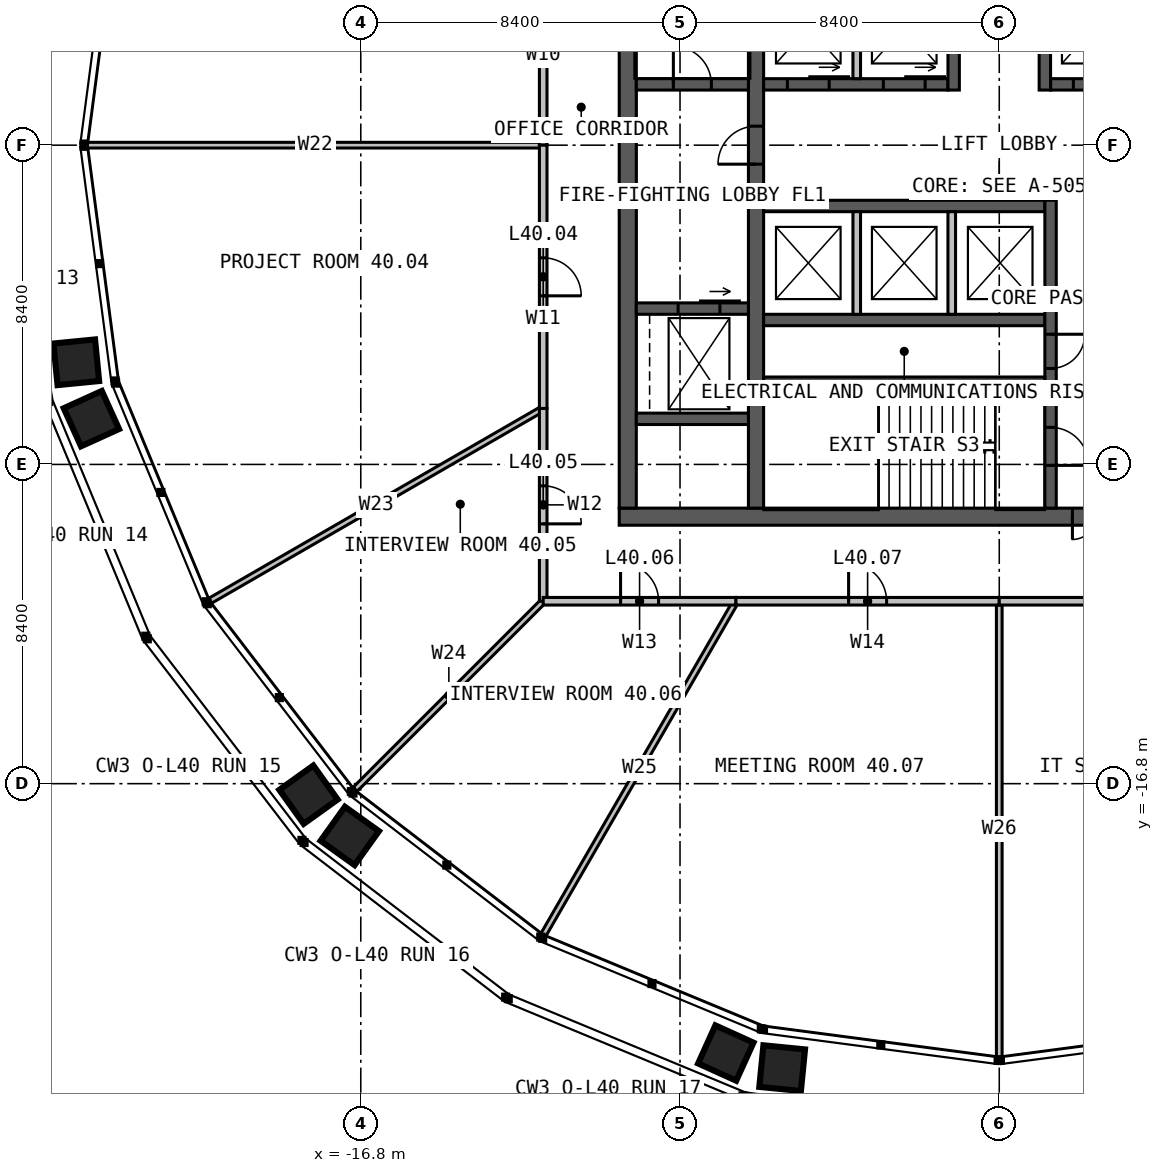
"""IFC4 building model, lengths in metres.
Left out: names, types, materials, properties, quantities, classifications, styles, units other than length and angle.
Written with IfcOpenShell. Run it as: python <this file> out.ifc"""

import sys

from ifc_helpers import new_model, si_unit, direction, frame, frame_2d, origin, place, context, subcontext, project, spatial, rectangle, extrude, element, fill, save


model = new_model("IFC4")
c1 = context("Model", 3, precision=1e-05, world=origin(), true_north=direction((0.0, 1.0)))
c2 = subcontext(c1, "Body", "Model", "MODEL_VIEW")
j1 = project(units=[si_unit("LENGTHUNIT", "METRE"), si_unit("PLANEANGLEUNIT", "RADIAN")], contexts=[c1])
p1 = place(None, origin())
s1 = spatial("IfcSite", under=j1, at=p1, CompositionType="ELEMENT")
p2 = place(p1, origin())
s2 = spatial("IfcBuilding", under=s1, at=p2, CompositionType="ELEMENT")
p3 = place(p2, frame((0.0, 0.0, 167.0)))
s3 = spatial("IfcBuildingStorey", under=s2, at=p3, CompositionType="ELEMENT", Elevation=167.0)
p4 = place(p3, frame((10.0, -9.775, 0.0), z_axis=(0.0, 0.0, 1.0), x_axis=(-1.0, 0.0, 0.0)))
e1 = element("IfcWall", 1, at=p4, inside=s3, PredefinedType="SOLIDWALL", context=c2, shape_type="SweptSolid", body=[
    extrude(rectangle(XDim=20.0, YDim=0.45, at=frame_2d((10.0, 0.0))), origin(), (0.0, 0.0, 1.0), 4.0),
])
p5 = place(p4, frame((6.875, 0.0, 0.0)))
e2 = element("IfcOpeningElement", 2, at=p5, cuts=e1, PredefinedType="OPENING", context=c2, shape_type="SweptSolid", body=[
    extrude(rectangle(XDim=1.2, YDim=2.2, at=frame_2d((0.6, 1.1))), frame((0.0, 0.235, 0.0), z_axis=(0.0, -1.0, 0.0), x_axis=(1.0, 0.0, 0.0)), (0.0, 0.0, 1.0), 0.47),
])
p6 = place(p3, frame((-9.775, 9.55, 0.0), z_axis=(0.0, 0.0, 1.0), x_axis=(0.0, -1.0, 0.0)))
e3 = element("IfcWall", 3, at=p6, inside=s3, PredefinedType="SOLIDWALL", context=c2, shape_type="SweptSolid", body=[
    extrude(rectangle(XDim=19.1, YDim=0.45, at=frame_2d((9.55, 0.0))), origin(), (0.0, 0.0, 1.0), 4.0),
])
p7 = place(p3, frame((-6.4, -9.55, 0.0), z_axis=(0.0, 0.0, 1.0), x_axis=(0.0, 1.0, 0.0)))
e4 = element("IfcWall", 4, at=p7, inside=s3, PredefinedType="SOLIDWALL", context=c2, shape_type="SweptSolid", body=[
    extrude(rectangle(XDim=19.1, YDim=0.4, at=frame_2d((9.55, 0.0))), origin(), (0.0, 0.0, 1.0), 4.0),
])
p8 = place(p7, frame((9.05, 0.0, 0.0)))
e5 = element("IfcOpeningElement", 5, at=p8, cuts=e4, PredefinedType="OPENING", context=c2, shape_type="SweptSolid", body=[
    extrude(rectangle(XDim=1.0, YDim=2.2, at=frame_2d((0.5, 1.1))), frame((0.0, 0.21, 0.0), z_axis=(0.0, -1.0, 0.0), x_axis=(1.0, 0.0, 0.0)), (0.0, 0.0, 1.0), 0.42),
])
p9 = place(p3, frame((-6.2, 1.6, 0.0), z_axis=(0.0, 0.0, 1.0), x_axis=(1.0, 0.0, 0.0)))
e6 = element("IfcWall", 6, at=p9, inside=s3, PredefinedType="SOLIDWALL", context=c2, shape_type="SweptSolid", body=[
    extrude(rectangle(XDim=4.85, YDim=0.3, at=frame_2d((2.425, 0.0))), origin(), (0.0, 0.0, 1.0), 4.0),
])
p10 = place(p9, frame((0.625, 0.0, 0.0)))
e7 = element("IfcOpeningElement", 7, at=p10, cuts=e6, PredefinedType="OPENING", context=c2, shape_type="SweptSolid", body=[
    extrude(rectangle(XDim=1.1, YDim=2.2, at=frame_2d((0.55, 1.1))), frame((0.0, 0.16, 0.0), z_axis=(0.0, -1.0, 0.0), x_axis=(1.0, 0.0, 0.0)), (0.0, 0.0, 1.0), 0.32),
])
p11 = place(p9, frame((3.15, 0.0, 0.0)))
e8 = element("IfcOpeningElement", 8, at=p11, cuts=e6, PredefinedType="OPENING", context=c2, shape_type="SweptSolid", body=[
    extrude(rectangle(XDim=1.1, YDim=2.2, at=frame_2d((0.55, 1.1))), frame((0.0, 0.16, 0.0), z_axis=(0.0, -1.0, 0.0), x_axis=(1.0, 0.0, 0.0)), (0.0, 0.0, 1.0), 0.32),
])
p12 = place(p3, frame((1.35, 1.6, 0.0), z_axis=(0.0, 0.0, 1.0), x_axis=(1.0, 0.0, 0.0)))
e9 = element("IfcWall", 9, at=p12, inside=s3, PredefinedType="SOLIDWALL", context=c2, shape_type="SweptSolid", body=[
    extrude(rectangle(XDim=4.85, YDim=0.3, at=frame_2d((2.425, 0.0))), origin(), (0.0, 0.0, 1.0), 4.0),
])
p13 = place(p12, frame((0.6, 0.0, 0.0)))
e10 = element("IfcOpeningElement", 10, at=p13, cuts=e9, PredefinedType="OPENING", context=c2, shape_type="SweptSolid", body=[
    extrude(rectangle(XDim=1.1, YDim=2.2, at=frame_2d((0.55, 1.1))), frame((0.0, 0.16, 0.0), z_axis=(0.0, -1.0, 0.0), x_axis=(1.0, 0.0, 0.0)), (0.0, 0.0, 1.0), 0.32),
])
p14 = place(p12, frame((3.125, 0.0, 0.0)))
e11 = element("IfcOpeningElement", 11, at=p14, cuts=e9, PredefinedType="OPENING", context=c2, shape_type="SweptSolid", body=[
    extrude(rectangle(XDim=1.1, YDim=2.2, at=frame_2d((0.55, 1.1))), frame((0.0, 0.16, 0.0), z_axis=(0.0, -1.0, 0.0), x_axis=(1.0, 0.0, 0.0)), (0.0, 0.0, 1.0), 0.32),
])
p15 = place(p3, frame((-1.2, 1.45, 0.0), z_axis=(0.0, 0.0, 1.0), x_axis=(0.0, 1.0, 0.0)))
e12 = element("IfcWall", 12, at=p15, inside=s3, PredefinedType="SOLIDWALL", context=c2, shape_type="SweptSolid", body=[
    extrude(rectangle(XDim=8.1, YDim=0.3, at=frame_2d((4.05, 0.0))), origin(), (0.0, 0.0, 1.0), 4.0),
])
p16 = place(p15, frame((5.05, 0.0, 0.0)))
e13 = element("IfcOpeningElement", 13, at=p16, cuts=e12, PredefinedType="OPENING", context=c2, shape_type="SweptSolid", body=[
    extrude(rectangle(XDim=1.0, YDim=2.2, at=frame_2d((0.5, 1.1))), frame((0.0, 0.16, 0.0), z_axis=(0.0, -1.0, 0.0), x_axis=(1.0, 0.0, 0.0)), (0.0, 0.0, 1.0), 0.32),
])
p17 = place(p3, frame((1.2, 1.45, 0.0), z_axis=(0.0, 0.0, 1.0), x_axis=(0.0, 1.0, 0.0)))
e14 = element("IfcWall", 14, at=p17, inside=s3, PredefinedType="SOLIDWALL", context=c2, shape_type="SweptSolid", body=[
    extrude(rectangle(XDim=8.1, YDim=0.3, at=frame_2d((4.05, 0.0))), origin(), (0.0, 0.0, 1.0), 4.0),
])
p18 = place(p17, frame((3.8, 0.0, 0.0)))
e15 = element("IfcOpeningElement", 15, at=p18, cuts=e14, PredefinedType="OPENING", context=c2, shape_type="SweptSolid", body=[
    extrude(rectangle(XDim=1.0, YDim=2.2, at=frame_2d((0.5, 1.1))), frame((0.0, 0.16, 0.0), z_axis=(0.0, -1.0, 0.0), x_axis=(1.0, 0.0, 0.0)), (0.0, 0.0, 1.0), 0.32),
])
p19 = place(p17, frame((6.15, 0.0, 0.0)))
e16 = element("IfcOpeningElement", 16, at=p19, cuts=e14, PredefinedType="OPENING", context=c2, shape_type="SweptSolid", body=[
    extrude(rectangle(XDim=1.0, YDim=2.2, at=frame_2d((0.5, 1.1))), frame((0.0, 0.16, 0.0), z_axis=(0.0, -1.0, 0.0), x_axis=(1.0, 0.0, 0.0)), (0.0, 0.0, 1.0), 0.32),
])
for number, where, z_axis, x_axis in (
    (17, (-6.2, -1.6, 0.0), (0.0, 0.0, 1.0), (1.0, 0.0, 0.0)),
    (18, (-6.2, -4.6, 0.0), (0.0, 0.0, 1.0), (1.0, 0.0, 0.0)),
):
    element("IfcWall", number, at=place(p3, frame(where, z_axis=z_axis, x_axis=x_axis)), inside=s3, PredefinedType="SOLIDWALL", context=c2, shape_type="SweptSolid", body=[
        extrude(rectangle(XDim=7.4, YDim=0.3, at=frame_2d((3.7, 0.0))), origin(), (0.0, 0.0, 1.0), 4.0),
    ])
p20 = place(p3, frame((1.35, -1.45, 0.0), z_axis=(0.0, 0.0, 1.0), x_axis=(0.0, -1.0, 0.0)))
e19 = element("IfcWall", 19, at=p20, inside=s3, PredefinedType="SOLIDWALL", context=c2, shape_type="SweptSolid", body=[
    extrude(rectangle(XDim=8.1, YDim=0.3, at=frame_2d((4.05, 0.0))), origin(), (0.0, 0.0, 1.0), 4.0),
])
p21 = place(p20, frame((5.975, 0.0, 0.0)))
e20 = element("IfcOpeningElement", 20, at=p21, cuts=e19, PredefinedType="OPENING", context=c2, shape_type="SweptSolid", body=[
    extrude(rectangle(XDim=1.0, YDim=2.2, at=frame_2d((0.5, 1.1))), frame((0.0, 0.16, 0.0), z_axis=(0.0, -1.0, 0.0), x_axis=(1.0, 0.0, 0.0)), (0.0, 0.0, 1.0), 0.32),
])
p22 = place(p20, frame((3.525, 0.0, 0.0)))
e21 = element("IfcOpeningElement", 21, at=p22, cuts=e19, PredefinedType="OPENING", context=c2, shape_type="SweptSolid", body=[
    extrude(rectangle(XDim=0.9, YDim=2.2, at=frame_2d((0.45, 1.1))), frame((0.0, 0.16, 0.0), z_axis=(0.0, -1.0, 0.0), x_axis=(1.0, 0.0, 0.0)), (0.0, 0.0, 1.0), 0.32),
])
p23 = place(p3, frame((-6.2, -6.2, 0.0), z_axis=(0.0, 0.0, 1.0), x_axis=(1.0, 0.0, 0.0)))
e22 = element("IfcWall", 22, at=p23, inside=s3, PredefinedType="SOLIDWALL", context=c2, shape_type="SweptSolid", body=[
    extrude(rectangle(XDim=7.4, YDim=0.2, at=frame_2d((3.7, 0.0))), origin(), (0.0, 0.0, 1.0), 4.0),
])
p24 = place(p3, frame((-9.55, 1.6, 0.0), z_axis=(0.0, 0.0, 1.0), x_axis=(1.0, 0.0, 0.0)))
e23 = element("IfcWall", 23, at=p24, inside=s3, PredefinedType="SOLIDWALL", context=c2, shape_type="SweptSolid", body=[
    extrude(rectangle(XDim=2.95, YDim=0.3, at=frame_2d((1.475, 0.0))), origin(), (0.0, 0.0, 1.0), 4.0),
])
p25 = place(p24, frame((0.975, 0.0, 0.0)))
e24 = element("IfcOpeningElement", 24, at=p25, cuts=e23, PredefinedType="OPENING", context=c2, shape_type="SweptSolid", body=[
    extrude(rectangle(XDim=1.0, YDim=2.2, at=frame_2d((0.5, 1.1))), frame((0.0, 0.16, 0.0), z_axis=(0.0, -1.0, 0.0), x_axis=(1.0, 0.0, 0.0)), (0.0, 0.0, 1.0), 0.32),
])
p26 = place(p3, frame((-9.55, -4.3, 0.0), z_axis=(0.0, 0.0, 1.0), x_axis=(1.0, 0.0, 0.0)))
e25 = element("IfcWall", 25, at=p26, inside=s3, PredefinedType="SOLIDWALL", context=c2, shape_type="SweptSolid", body=[
    extrude(rectangle(XDim=2.95, YDim=0.3, at=frame_2d((1.475, 0.0))), origin(), (0.0, 0.0, 1.0), 4.0),
])
p27 = place(p26, frame((1.1, 0.0, 0.0)))
e26 = element("IfcOpeningElement", 26, at=p27, cuts=e25, PredefinedType="OPENING", context=c2, shape_type="SweptSolid", body=[
    extrude(rectangle(XDim=1.1, YDim=2.2, at=frame_2d((0.55, 1.1))), frame((0.0, 0.16, 0.0), z_axis=(0.0, -1.0, 0.0), x_axis=(1.0, 0.0, 0.0)), (0.0, 0.0, 1.0), 0.32),
])
p28 = place(p3, frame((-9.55, -7.2, 0.0), z_axis=(0.0, 0.0, 1.0), x_axis=(1.0, 0.0, 0.0)))
e27 = element("IfcWall", 27, at=p28, inside=s3, PredefinedType="SOLIDWALL", context=c2, shape_type="SweptSolid", body=[
    extrude(rectangle(XDim=2.95, YDim=0.3, at=frame_2d((1.475, 0.0))), origin(), (0.0, 0.0, 1.0), 4.0),
])
for number, where, z_axis, x_axis in (
    (28, (-3.75, 1.75, 0.0), (0.0, 0.0, 1.0), (0.0, 1.0, 0.0)),
    (29, (-3.75, -1.75, 0.0), (0.0, 0.0, 1.0), (0.0, -1.0, 0.0)),
    (30, (-1.25, -1.75, 0.0), (0.0, 0.0, 1.0), (0.0, -1.0, 0.0)),
):
    element("IfcWall", number, at=place(p3, frame(where, z_axis=z_axis, x_axis=x_axis)), inside=s3, PredefinedType="SOLIDWALL", context=c2, shape_type="SweptSolid", body=[
        extrude(rectangle(XDim=2.7, YDim=0.2, at=frame_2d((1.35, 0.0))), origin(), (0.0, 0.0, 1.0), 3.75),
    ])
p29 = place(p3, frame((-12.0, 0.0, 0.0), z_axis=(0.0, 0.0, 1.0), x_axis=(-1.0, 0.0, 0.0)))
e31 = element("IfcWall", 31, at=p29, inside=s3, PredefinedType="PARTITIONING", context=c2, shape_type="SweptSolid", body=[
    extrude(rectangle(XDim=11.992, YDim=0.15, at=frame_2d((5.996, 0.0))), origin(), (0.0, 0.0, 1.0), 2.79),
])
p30 = place(p3, frame((-12.0, -6.928, 0.0), z_axis=(0.0, 0.0, 1.0), x_axis=(-0.866025941747, -0.49999906822, 0.0)))
e32 = element("IfcWall", 32, at=p30, inside=s3, PredefinedType="PARTITIONING", context=c2, shape_type="SweptSolid", body=[
    extrude(rectangle(XDim=10.136, YDim=0.15, at=frame_2d((5.068, 0.0))), origin(), (0.0, 0.0, 1.0), 2.79),
])
p31 = place(p3, frame((-12.0, -12.0, 0.0), z_axis=(0.0, 0.0, 1.0), x_axis=(-0.707106781187, -0.707106781187, 0.0)))
e33 = element("IfcWall", 33, at=p31, inside=s3, PredefinedType="PARTITIONING", context=c2, shape_type="SweptSolid", body=[
    extrude(rectangle(XDim=7.022, YDim=0.15, at=frame_2d((3.511, 0.0))), origin(), (0.0, 0.0, 1.0), 2.79),
])
p32 = place(p3, frame((-6.928, -12.0, 0.0), z_axis=(0.0, 0.0, 1.0), x_axis=(-0.49999906822, -0.866025941747, 0.0)))
e34 = element("IfcWall", 34, at=p32, inside=s3, PredefinedType="PARTITIONING", context=c2, shape_type="SweptSolid", body=[
    extrude(rectangle(XDim=10.136, YDim=0.15, at=frame_2d((5.068, 0.0))), origin(), (0.0, 0.0, 1.0), 2.79),
])
p33 = place(p3, frame((0.0, -12.0, 0.0), z_axis=(0.0, 0.0, 1.0), x_axis=(0.0, -1.0, 0.0)))
e35 = element("IfcWall", 35, at=p33, inside=s3, PredefinedType="PARTITIONING", context=c2, shape_type="SweptSolid", body=[
    extrude(rectangle(XDim=11.992, YDim=0.15, at=frame_2d((5.996, 0.0))), origin(), (0.0, 0.0, 1.0), 2.79),
])
p34 = place(p3, frame((-12.0, 6.928, 0.0), z_axis=(0.0, 0.0, 1.0), x_axis=(0.0, -1.0, 0.0)))
e36 = element("IfcWall", 36, at=p34, inside=s3, PredefinedType="PARTITIONING", context=c2, shape_type="SweptSolid", body=[
    extrude(rectangle(XDim=6.928, YDim=0.2, at=frame_2d((3.464, 0.0))), origin(), (0.0, 0.0, 1.0), 3.8),
])
p35 = place(p34, frame((2.964, 0.0, 0.0)))
e37 = element("IfcOpeningElement", 37, at=p35, cuts=e36, PredefinedType="OPENING", context=c2, shape_type="SweptSolid", body=[
    extrude(rectangle(XDim=1.0, YDim=2.2, at=frame_2d((0.5, 1.1))), frame((0.0, 0.11, 0.0), z_axis=(0.0, -1.0, 0.0), x_axis=(1.0, 0.0, 0.0)), (0.0, 0.0, 1.0), 0.22),
])
p36 = place(p3, frame((-12.0, 0.0, 0.0), z_axis=(0.0, 0.0, 1.0), x_axis=(0.0, -1.0, 0.0)))
e38 = element("IfcWall", 38, at=p36, inside=s3, PredefinedType="PARTITIONING", context=c2, shape_type="SweptSolid", body=[
    extrude(rectangle(XDim=6.928, YDim=0.2, at=frame_2d((3.464, 0.0))), origin(), (0.0, 0.0, 1.0), 3.8),
])
p37 = place(p36, frame((2.964, 0.0, 0.0)))
e39 = element("IfcOpeningElement", 39, at=p37, cuts=e38, PredefinedType="OPENING", context=c2, shape_type="SweptSolid", body=[
    extrude(rectangle(XDim=1.0, YDim=2.2, at=frame_2d((0.5, 1.1))), frame((0.0, 0.11, 0.0), z_axis=(0.0, -1.0, 0.0), x_axis=(1.0, 0.0, 0.0)), (0.0, 0.0, 1.0), 0.22),
])
p38 = place(p3, frame((-12.0, -6.928, 0.0), z_axis=(0.0, 0.0, 1.0), x_axis=(0.0, -1.0, 0.0)))
e40 = element("IfcWall", 40, at=p38, inside=s3, PredefinedType="PARTITIONING", context=c2, shape_type="SweptSolid", body=[
    extrude(rectangle(XDim=5.072, YDim=0.2, at=frame_2d((2.536, 0.0))), origin(), (0.0, 0.0, 1.0), 3.8),
])
p39 = place(p38, frame((2.036, 0.0, 0.0)))
e41 = element("IfcOpeningElement", 41, at=p39, cuts=e40, PredefinedType="OPENING", context=c2, shape_type="SweptSolid", body=[
    extrude(rectangle(XDim=1.0, YDim=2.2, at=frame_2d((0.5, 1.1))), frame((0.0, 0.11, 0.0), z_axis=(0.0, -1.0, 0.0), x_axis=(1.0, 0.0, 0.0)), (0.0, 0.0, 1.0), 0.22),
])
p40 = place(p3, frame((-12.0, -12.0, 0.0), z_axis=(0.0, 0.0, 1.0), x_axis=(1.0, 0.0, 0.0)))
e42 = element("IfcWall", 42, at=p40, inside=s3, PredefinedType="PARTITIONING", context=c2, shape_type="SweptSolid", body=[
    extrude(rectangle(XDim=5.072, YDim=0.2, at=frame_2d((2.536, 0.0))), origin(), (0.0, 0.0, 1.0), 3.8),
])
p41 = place(p40, frame((2.036, 0.0, 0.0)))
e43 = element("IfcOpeningElement", 43, at=p41, cuts=e42, PredefinedType="OPENING", context=c2, shape_type="SweptSolid", body=[
    extrude(rectangle(XDim=1.0, YDim=2.2, at=frame_2d((0.5, 1.1))), frame((0.0, 0.11, 0.0), z_axis=(0.0, -1.0, 0.0), x_axis=(1.0, 0.0, 0.0)), (0.0, 0.0, 1.0), 0.22),
])
p42 = place(p3, frame((-6.928, -12.0, 0.0), z_axis=(0.0, 0.0, 1.0), x_axis=(1.0, 0.0, 0.0)))
e44 = element("IfcWall", 44, at=p42, inside=s3, PredefinedType="PARTITIONING", context=c2, shape_type="SweptSolid", body=[
    extrude(rectangle(XDim=6.928, YDim=0.2, at=frame_2d((3.464, 0.0))), origin(), (0.0, 0.0, 1.0), 3.8),
])
p43 = place(p42, frame((2.964, 0.0, 0.0)))
e45 = element("IfcOpeningElement", 45, at=p43, cuts=e44, PredefinedType="OPENING", context=c2, shape_type="SweptSolid", body=[
    extrude(rectangle(XDim=1.0, YDim=2.2, at=frame_2d((0.5, 1.1))), frame((0.0, 0.11, 0.0), z_axis=(0.0, -1.0, 0.0), x_axis=(1.0, 0.0, 0.0)), (0.0, 0.0, 1.0), 0.22),
])
p44 = place(p3, frame((0.0, -12.0, 0.0), z_axis=(0.0, 0.0, 1.0), x_axis=(1.0, 0.0, 0.0)))
e46 = element("IfcWall", 46, at=p44, inside=s3, PredefinedType="PARTITIONING", context=c2, shape_type="SweptSolid", body=[
    extrude(rectangle(XDim=6.928, YDim=0.2, at=frame_2d((3.464, 0.0))), origin(), (0.0, 0.0, 1.0), 3.8),
])
p45 = place(p44, frame((2.564, 0.0, 0.0)))
e47 = element("IfcOpeningElement", 47, at=p45, cuts=e46, PredefinedType="OPENING", context=c2, shape_type="SweptSolid", body=[
    extrude(rectangle(XDim=1.8, YDim=2.2, at=frame_2d((0.9, 1.1))), frame((0.0, 0.11, 0.0), z_axis=(0.0, -1.0, 0.0), x_axis=(1.0, 0.0, 0.0)), (0.0, 0.0, 1.0), 0.22),
])
p46 = place(p5, origin())
e48 = element("IfcDoor", 48, at=p46, inside=s3, OperationType="DOUBLE_DOOR_SINGLE_SWING", PredefinedType="DOOR", context=c2, shape_type="SweptSolid", body=[
    extrude(rectangle(XDim=1.2, YDim=2.2, at=frame_2d((0.6, 1.1))), frame((0.0, 0.025, 0.0), z_axis=(0.0, -1.0, 0.0), x_axis=(1.0, 0.0, 0.0)), (0.0, 0.0, 1.0), 0.05),
])
fill(e2, e48)
p47 = place(p8, origin())
e49 = element("IfcDoor", 49, at=p47, inside=s3, OperationType="SINGLE_SWING_LEFT", PredefinedType="DOOR", context=c2, shape_type="SweptSolid", body=[
    extrude(rectangle(XDim=1.0, YDim=2.2, at=frame_2d((0.5, 1.1))), frame((0.0, 0.025, 0.0), z_axis=(0.0, -1.0, 0.0), x_axis=(1.0, 0.0, 0.0)), (0.0, 0.0, 1.0), 0.05),
])
fill(e5, e49)
p48 = place(p25, origin())
e50 = element("IfcDoor", 50, at=p48, inside=s3, OperationType="SINGLE_SWING_LEFT", PredefinedType="DOOR", context=c2, shape_type="SweptSolid", body=[
    extrude(rectangle(XDim=1.0, YDim=2.2, at=frame_2d((0.5, 1.1))), frame((0.0, 0.025, 0.0), z_axis=(0.0, -1.0, 0.0), x_axis=(1.0, 0.0, 0.0)), (0.0, 0.0, 1.0), 0.05),
])
fill(e24, e50)
p49 = place(p21, origin())
e51 = element("IfcDoor", 51, at=p49, inside=s3, OperationType="SINGLE_SWING_RIGHT", PredefinedType="DOOR", context=c2, shape_type="SweptSolid", body=[
    extrude(rectangle(XDim=1.0, YDim=2.2, at=frame_2d((0.5, 1.1))), frame((0.0, 0.025, 0.0), z_axis=(0.0, -1.0, 0.0), x_axis=(1.0, 0.0, 0.0)), (0.0, 0.0, 1.0), 0.05),
])
fill(e20, e51)
p50 = place(p22, origin())
e52 = element("IfcDoor", 52, at=p50, inside=s3, OperationType="SINGLE_SWING_LEFT", PredefinedType="DOOR", context=c2, shape_type="SweptSolid", body=[
    extrude(rectangle(XDim=0.9, YDim=2.2, at=frame_2d((0.45, 1.1))), frame((0.0, 0.025, 0.0), z_axis=(0.0, -1.0, 0.0), x_axis=(1.0, 0.0, 0.0)), (0.0, 0.0, 1.0), 0.05),
])
fill(e21, e52)
p51 = place(p10, origin())
e53 = element("IfcDoor", 53, at=p51, inside=s3, OperationType="SLIDING_TO_LEFT", PredefinedType="DOOR", context=c2, shape_type="SweptSolid", body=[
    extrude(rectangle(XDim=1.1, YDim=2.2, at=frame_2d((0.55, 1.1))), frame((0.0, 0.025, 0.0), z_axis=(0.0, -1.0, 0.0), x_axis=(1.0, 0.0, 0.0)), (0.0, 0.0, 1.0), 0.05),
])
fill(e7, e53)
p52 = place(p11, origin())
e54 = element("IfcDoor", 54, at=p52, inside=s3, OperationType="SLIDING_TO_LEFT", PredefinedType="DOOR", context=c2, shape_type="SweptSolid", body=[
    extrude(rectangle(XDim=1.1, YDim=2.2, at=frame_2d((0.55, 1.1))), frame((0.0, 0.025, 0.0), z_axis=(0.0, -1.0, 0.0), x_axis=(1.0, 0.0, 0.0)), (0.0, 0.0, 1.0), 0.05),
])
fill(e8, e54)
p53 = place(p13, origin())
e55 = element("IfcDoor", 55, at=p53, inside=s3, OperationType="SLIDING_TO_LEFT", PredefinedType="DOOR", context=c2, shape_type="SweptSolid", body=[
    extrude(rectangle(XDim=1.1, YDim=2.2, at=frame_2d((0.55, 1.1))), frame((0.0, 0.025, 0.0), z_axis=(0.0, -1.0, 0.0), x_axis=(1.0, 0.0, 0.0)), (0.0, 0.0, 1.0), 0.05),
])
fill(e10, e55)
p54 = place(p27, origin())
e56 = element("IfcDoor", 56, at=p54, inside=s3, OperationType="SLIDING_TO_LEFT", PredefinedType="DOOR", context=c2, shape_type="SweptSolid", body=[
    extrude(rectangle(XDim=1.1, YDim=2.2, at=frame_2d((0.55, 1.1))), frame((0.0, 0.025, 0.0), z_axis=(0.0, -1.0, 0.0), x_axis=(1.0, 0.0, 0.0)), (0.0, 0.0, 1.0), 0.05),
])
fill(e26, e56)
p55 = place(p37, origin())
e57 = element("IfcDoor", 57, at=p55, inside=s3, OperationType="SINGLE_SWING_RIGHT", PredefinedType="DOOR", context=c2, shape_type="SweptSolid", body=[
    extrude(rectangle(XDim=1.0, YDim=2.2, at=frame_2d((0.5, 1.1))), frame((0.0, 0.025, 0.0), z_axis=(0.0, -1.0, 0.0), x_axis=(1.0, 0.0, 0.0)), (0.0, 0.0, 1.0), 0.05),
])
fill(e39, e57)
p56 = place(p39, origin())
e58 = element("IfcDoor", 58, at=p56, inside=s3, OperationType="SINGLE_SWING_RIGHT", PredefinedType="DOOR", context=c2, shape_type="SweptSolid", body=[
    extrude(rectangle(XDim=1.0, YDim=2.2, at=frame_2d((0.5, 1.1))), frame((0.0, 0.025, 0.0), z_axis=(0.0, -1.0, 0.0), x_axis=(1.0, 0.0, 0.0)), (0.0, 0.0, 1.0), 0.05),
])
fill(e41, e58)
p57 = place(p41, origin())
e59 = element("IfcDoor", 59, at=p57, inside=s3, OperationType="SINGLE_SWING_LEFT", PredefinedType="DOOR", context=c2, shape_type="SweptSolid", body=[
    extrude(rectangle(XDim=1.0, YDim=2.2, at=frame_2d((0.5, 1.1))), frame((0.0, 0.025, 0.0), z_axis=(0.0, -1.0, 0.0), x_axis=(1.0, 0.0, 0.0)), (0.0, 0.0, 1.0), 0.05),
])
fill(e43, e59)
p58 = place(p43, origin())
e60 = element("IfcDoor", 60, at=p58, inside=s3, OperationType="SINGLE_SWING_LEFT", PredefinedType="DOOR", context=c2, shape_type="SweptSolid", body=[
    extrude(rectangle(XDim=1.0, YDim=2.2, at=frame_2d((0.5, 1.1))), frame((0.0, 0.025, 0.0), z_axis=(0.0, -1.0, 0.0), x_axis=(1.0, 0.0, 0.0)), (0.0, 0.0, 1.0), 0.05),
])
fill(e45, e60)
save(model, sys.argv[1])
